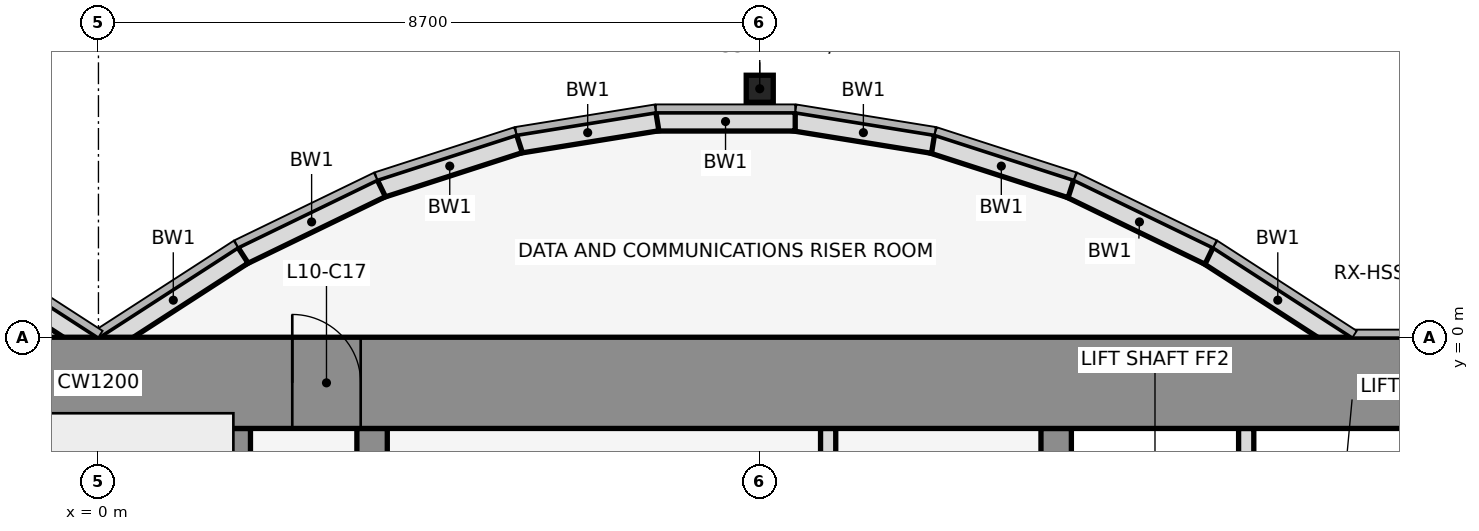
"""IFC4 building model, lengths in metres.
Left out: names, types, materials, properties, quantities, classifications, styles, units other than length and angle.
Written with IfcOpenShell. Run it as: python <this file> out.ifc"""

import sys

from ifc_helpers import new_model, si_unit, direction, frame, frame_2d, origin, origin_2d, place, context, subcontext, project, spatial, rectangle, hollow_rectangle, extrude, element, fill, save


model = new_model("IFC4")
c1 = context("Model", 3, precision=1e-05, world=origin(), true_north=direction((0.0, 1.0)))
c2 = subcontext(c1, "Body", "Model", "MODEL_VIEW")
j1 = project(units=[si_unit("LENGTHUNIT", "METRE"), si_unit("PLANEANGLEUNIT", "RADIAN")], contexts=[c1])
p1 = place(None, origin())
s1 = spatial("IfcSite", under=j1, at=p1, CompositionType="ELEMENT")
p2 = place(p1, origin())
s2 = spatial("IfcBuilding", under=s1, at=p2, CompositionType="ELEMENT")
p3 = place(p2, frame((0.0, 0.0, 53.0)))
s3 = spatial("IfcBuildingStorey", under=s2, at=p3, CompositionType="ELEMENT", Elevation=53.0)
p4 = place(p3, frame((8.7, 3.269, 0.0), z_axis=(0.0, 0.0, 1.0), x_axis=(1.0, 0.0, 0.0)))
e1 = element("IfcColumn", 1, at=p4, inside=s3, PredefinedType="COLUMN", context=c2, shape_type="SweptSolid", body=[
    extrude(hollow_rectangle(XDim=0.356, YDim=0.356, WallThickness=0.012, at=origin_2d()), origin(), (0.0, 0.0, 1.0), 4.5),
])
p5 = place(p3, frame((16.432, -0.105, 0.0), z_axis=(0.0, 0.0, 1.0), x_axis=(-0.83981312244, 0.542875602121, 0.0)))
e2 = element("IfcWall", 2, at=p5, inside=s3, PredefinedType="STANDARD", context=c2, shape_type="SweptSolid", body=[
    extrude(rectangle(XDim=2.183, YDim=0.25, at=frame_2d((1.091, 0.0))), origin(), (0.0, 0.0, 1.0), 4.35),
])
p6 = place(p3, frame((14.612, 1.073, 0.0), z_axis=(0.0, 0.0, 1.0), x_axis=(-0.89982408427, 0.436252928206, 0.0)))
e3 = element("IfcWall", 3, at=p6, inside=s3, PredefinedType="STANDARD", context=c2, shape_type="SweptSolid", body=[
    extrude(rectangle(XDim=2.038, YDim=0.25, at=frame_2d((1.019, 0.0))), origin(), (0.0, 0.0, 1.0), 4.35),
])
p7 = place(p3, frame((12.795, 1.955, 0.0), z_axis=(0.0, 0.0, 1.0), x_axis=(-0.951495806175, 0.307661714928, 0.0)))
e4 = element("IfcWall", 4, at=p7, inside=s3, PredefinedType="STANDARD", context=c2, shape_type="SweptSolid", body=[
    extrude(rectangle(XDim=1.927, YDim=0.25, at=frame_2d((0.963, 0.0))), origin(), (0.0, 0.0, 1.0), 4.35),
])
p8 = place(p3, frame((10.98, 2.543, 0.0), z_axis=(0.0, 0.0, 1.0), x_axis=(-0.987181718931, 0.159600293885, 0.0)))
e5 = element("IfcWall", 5, at=p8, inside=s3, PredefinedType="STANDARD", context=c2, shape_type="SweptSolid", body=[
    extrude(rectangle(XDim=1.857, YDim=0.25, at=frame_2d((0.929, 0.0))), origin(), (0.0, 0.0, 1.0), 4.35),
])
p9 = place(p3, frame((9.167, 2.838, 0.0), z_axis=(0.0, 0.0, 1.0), x_axis=(-1.0, 0.0, 0.0)))
e6 = element("IfcWall", 6, at=p9, inside=s3, PredefinedType="STANDARD", context=c2, shape_type="SweptSolid", body=[
    extrude(rectangle(XDim=1.833, YDim=0.25, at=frame_2d((0.917, 0.0))), origin(), (0.0, 0.0, 1.0), 4.35),
])
p10 = place(p3, frame((7.353, 2.84, 0.0), z_axis=(0.0, 0.0, 1.0), x_axis=(-0.987181718931, -0.159600293885, 0.0)))
e7 = element("IfcWall", 7, at=p10, inside=s3, PredefinedType="STANDARD", context=c2, shape_type="SweptSolid", body=[
    extrude(rectangle(XDim=1.857, YDim=0.25, at=frame_2d((0.929, 0.0))), origin(), (0.0, 0.0, 1.0), 4.35),
])
p11 = place(p3, frame((5.538, 2.548, 0.0), z_axis=(0.0, 0.0, 1.0), x_axis=(-0.951495806175, -0.307661714928, 0.0)))
e8 = element("IfcWall", 8, at=p11, inside=s3, PredefinedType="STANDARD", context=c2, shape_type="SweptSolid", body=[
    extrude(rectangle(XDim=1.927, YDim=0.25, at=frame_2d((0.963, 0.0))), origin(), (0.0, 0.0, 1.0), 4.35),
])
p12 = place(p3, frame((3.721, 1.962, 0.0), z_axis=(0.0, 0.0, 1.0), x_axis=(-0.89982408427, -0.436252928206, 0.0)))
e9 = element("IfcWall", 9, at=p12, inside=s3, PredefinedType="STANDARD", context=c2, shape_type="SweptSolid", body=[
    extrude(rectangle(XDim=2.038, YDim=0.25, at=frame_2d((1.019, 0.0))), origin(), (0.0, 0.0, 1.0), 4.35),
])
for number, where, z_axis, x_axis in (
    (10, (1.901, 1.08, 0.0), (0.0, 0.0, 1.0), (-0.84, -0.543, 0.0)),
    (11, (-0.068, -0.105, 0.0), (0.0, 0.0, 1.0), (-0.84, 0.543, 0.0)),
):
    element("IfcWall", number, at=place(p3, frame(where, z_axis=z_axis, x_axis=x_axis)), inside=s3, PredefinedType="STANDARD", context=c2, shape_type="SweptSolid", body=[
        extrude(rectangle(XDim=2.183, YDim=0.25, at=frame_2d((1.091, 0.0))), origin(), (0.0, 0.0, 1.0), 4.35),
    ])
p13 = place(p3, frame((1.8, -11.8, 0.0), z_axis=(0.0, 0.0, 1.0), x_axis=(0.0, 1.0, 0.0)))
e12 = element("IfcWall", 12, at=p13, inside=s3, PredefinedType="SHEAR", context=c2, shape_type="SweptSolid", body=[
    extrude(rectangle(XDim=10.6, YDim=0.4, at=frame_2d((5.3, 0.0))), origin(), (0.0, 0.0, 1.0), 4.5),
])
p14 = place(p3, frame((3.6, -11.8, 0.0), z_axis=(0.0, 0.0, 1.0), x_axis=(0.0, 1.0, 0.0)))
e13 = element("IfcWall", 13, at=p14, inside=s3, PredefinedType="SHEAR", context=c2, shape_type="SweptSolid", body=[
    extrude(rectangle(XDim=10.6, YDim=0.4, at=frame_2d((5.3, 0.0))), origin(), (0.0, 0.0, 1.0), 4.5),
])
p15 = place(p14, frame((1.35, 0.0, 0.0)))
e14 = element("IfcOpeningElement", 14, at=p15, cuts=e13, PredefinedType="OPENING", context=c2, shape_type="SweptSolid", body=[
    extrude(rectangle(XDim=0.9, YDim=2.1, at=frame_2d((0.45, 1.05))), frame((0.0, 0.212, 0.0), z_axis=(0.0, -1.0, 0.0), x_axis=(1.0, 0.0, 0.0)), (0.0, 0.0, 1.0), 0.424),
])
p16 = place(p3, frame((9.6, -4.6, 0.0), z_axis=(0.0, 0.0, 1.0), x_axis=(0.0, 1.0, 0.0)))
e15 = element("IfcWall", 15, at=p16, inside=s3, PredefinedType="PARTITIONING", context=c2, shape_type="SweptSolid", body=[
    extrude(rectangle(XDim=3.4, YDim=0.2, at=frame_2d((1.7, 0.0))), origin(), (0.0, 0.0, 1.0), 3.418),
])
p17 = place(p3, frame((12.6, -11.8, 0.0), z_axis=(0.0, 0.0, 1.0), x_axis=(0.0, 1.0, 0.0)))
e16 = element("IfcWall", 16, at=p17, inside=s3, PredefinedType="SHEAR", context=c2, shape_type="SweptSolid", body=[
    extrude(rectangle(XDim=10.6, YDim=0.4, at=frame_2d((5.3, 0.0))), origin(), (0.0, 0.0, 1.0), 4.5),
])
p18 = place(p17, frame((4.75, 0.0, 0.0)))
e17 = element("IfcOpeningElement", 17, at=p18, cuts=e16, PredefinedType="OPENING", context=c2, shape_type="SweptSolid", body=[
    extrude(rectangle(XDim=1.1, YDim=2.1, at=frame_2d((0.55, 1.05))), frame((0.0, 0.212, 0.0), z_axis=(0.0, -1.0, 0.0), x_axis=(1.0, 0.0, 0.0)), (0.0, 0.0, 1.0), 0.424),
])
p19 = place(p3, frame((15.1, -4.6, 0.0), z_axis=(0.0, 0.0, 1.0), x_axis=(0.0, 1.0, 0.0)))
e18 = element("IfcWall", 18, at=p19, inside=s3, PredefinedType="PARTITIONING", context=c2, shape_type="SweptSolid", body=[
    extrude(rectangle(XDim=3.4, YDim=0.2, at=frame_2d((1.7, 0.0))), origin(), (0.0, 0.0, 1.0), 3.418),
])
p20 = place(p3, frame((-22.0, -0.6, 0.0), z_axis=(0.0, 0.0, 1.0), x_axis=(1.0, 0.0, 0.0)))
e19 = element("IfcWall", 19, at=p20, inside=s3, PredefinedType="SHEAR", context=c2, shape_type="SweptSolid", body=[
    extrude(rectangle(XDim=44.0, YDim=1.2, at=frame_2d((22.0, 0.0))), origin(), (0.0, 0.0, 1.0), 4.5),
])
p21 = place(p20, frame((18.55, 0.0, 0.0)))
e20 = element("IfcOpeningElement", 20, at=p21, cuts=e19, PredefinedType="OPENING", context=c2, shape_type="SweptSolid", body=[
    extrude(rectangle(XDim=0.9, YDim=2.1, at=frame_2d((0.45, 1.05))), frame((0.0, 0.612, 0.0), z_axis=(0.0, -1.0, 0.0), x_axis=(1.0, 0.0, 0.0)), (0.0, 0.0, 1.0), 1.224),
])
p22 = place(p20, frame((24.55, 0.0, 0.0)))
e21 = element("IfcOpeningElement", 21, at=p22, cuts=e19, PredefinedType="OPENING", context=c2, shape_type="SweptSolid", body=[
    extrude(rectangle(XDim=0.9, YDim=2.1, at=frame_2d((0.45, 1.05))), frame((0.0, 0.612, 0.0), z_axis=(0.0, -1.0, 0.0), x_axis=(1.0, 0.0, 0.0)), (0.0, 0.0, 1.0), 1.224),
])
p23 = place(p22, origin())
e22 = element("IfcDoor", 22, at=p23, inside=s3, OperationType="SINGLE_SWING_LEFT", PredefinedType="DOOR", context=c2, shape_type="SweptSolid", body=[
    extrude(rectangle(XDim=0.9, YDim=2.1, at=frame_2d((0.45, 1.05))), frame((0.0, 0.025, 0.0), z_axis=(0.0, -1.0, 0.0), x_axis=(1.0, 0.0, 0.0)), (0.0, 0.0, 1.0), 0.05),
])
fill(e21, e22)
save(model, sys.argv[1])
